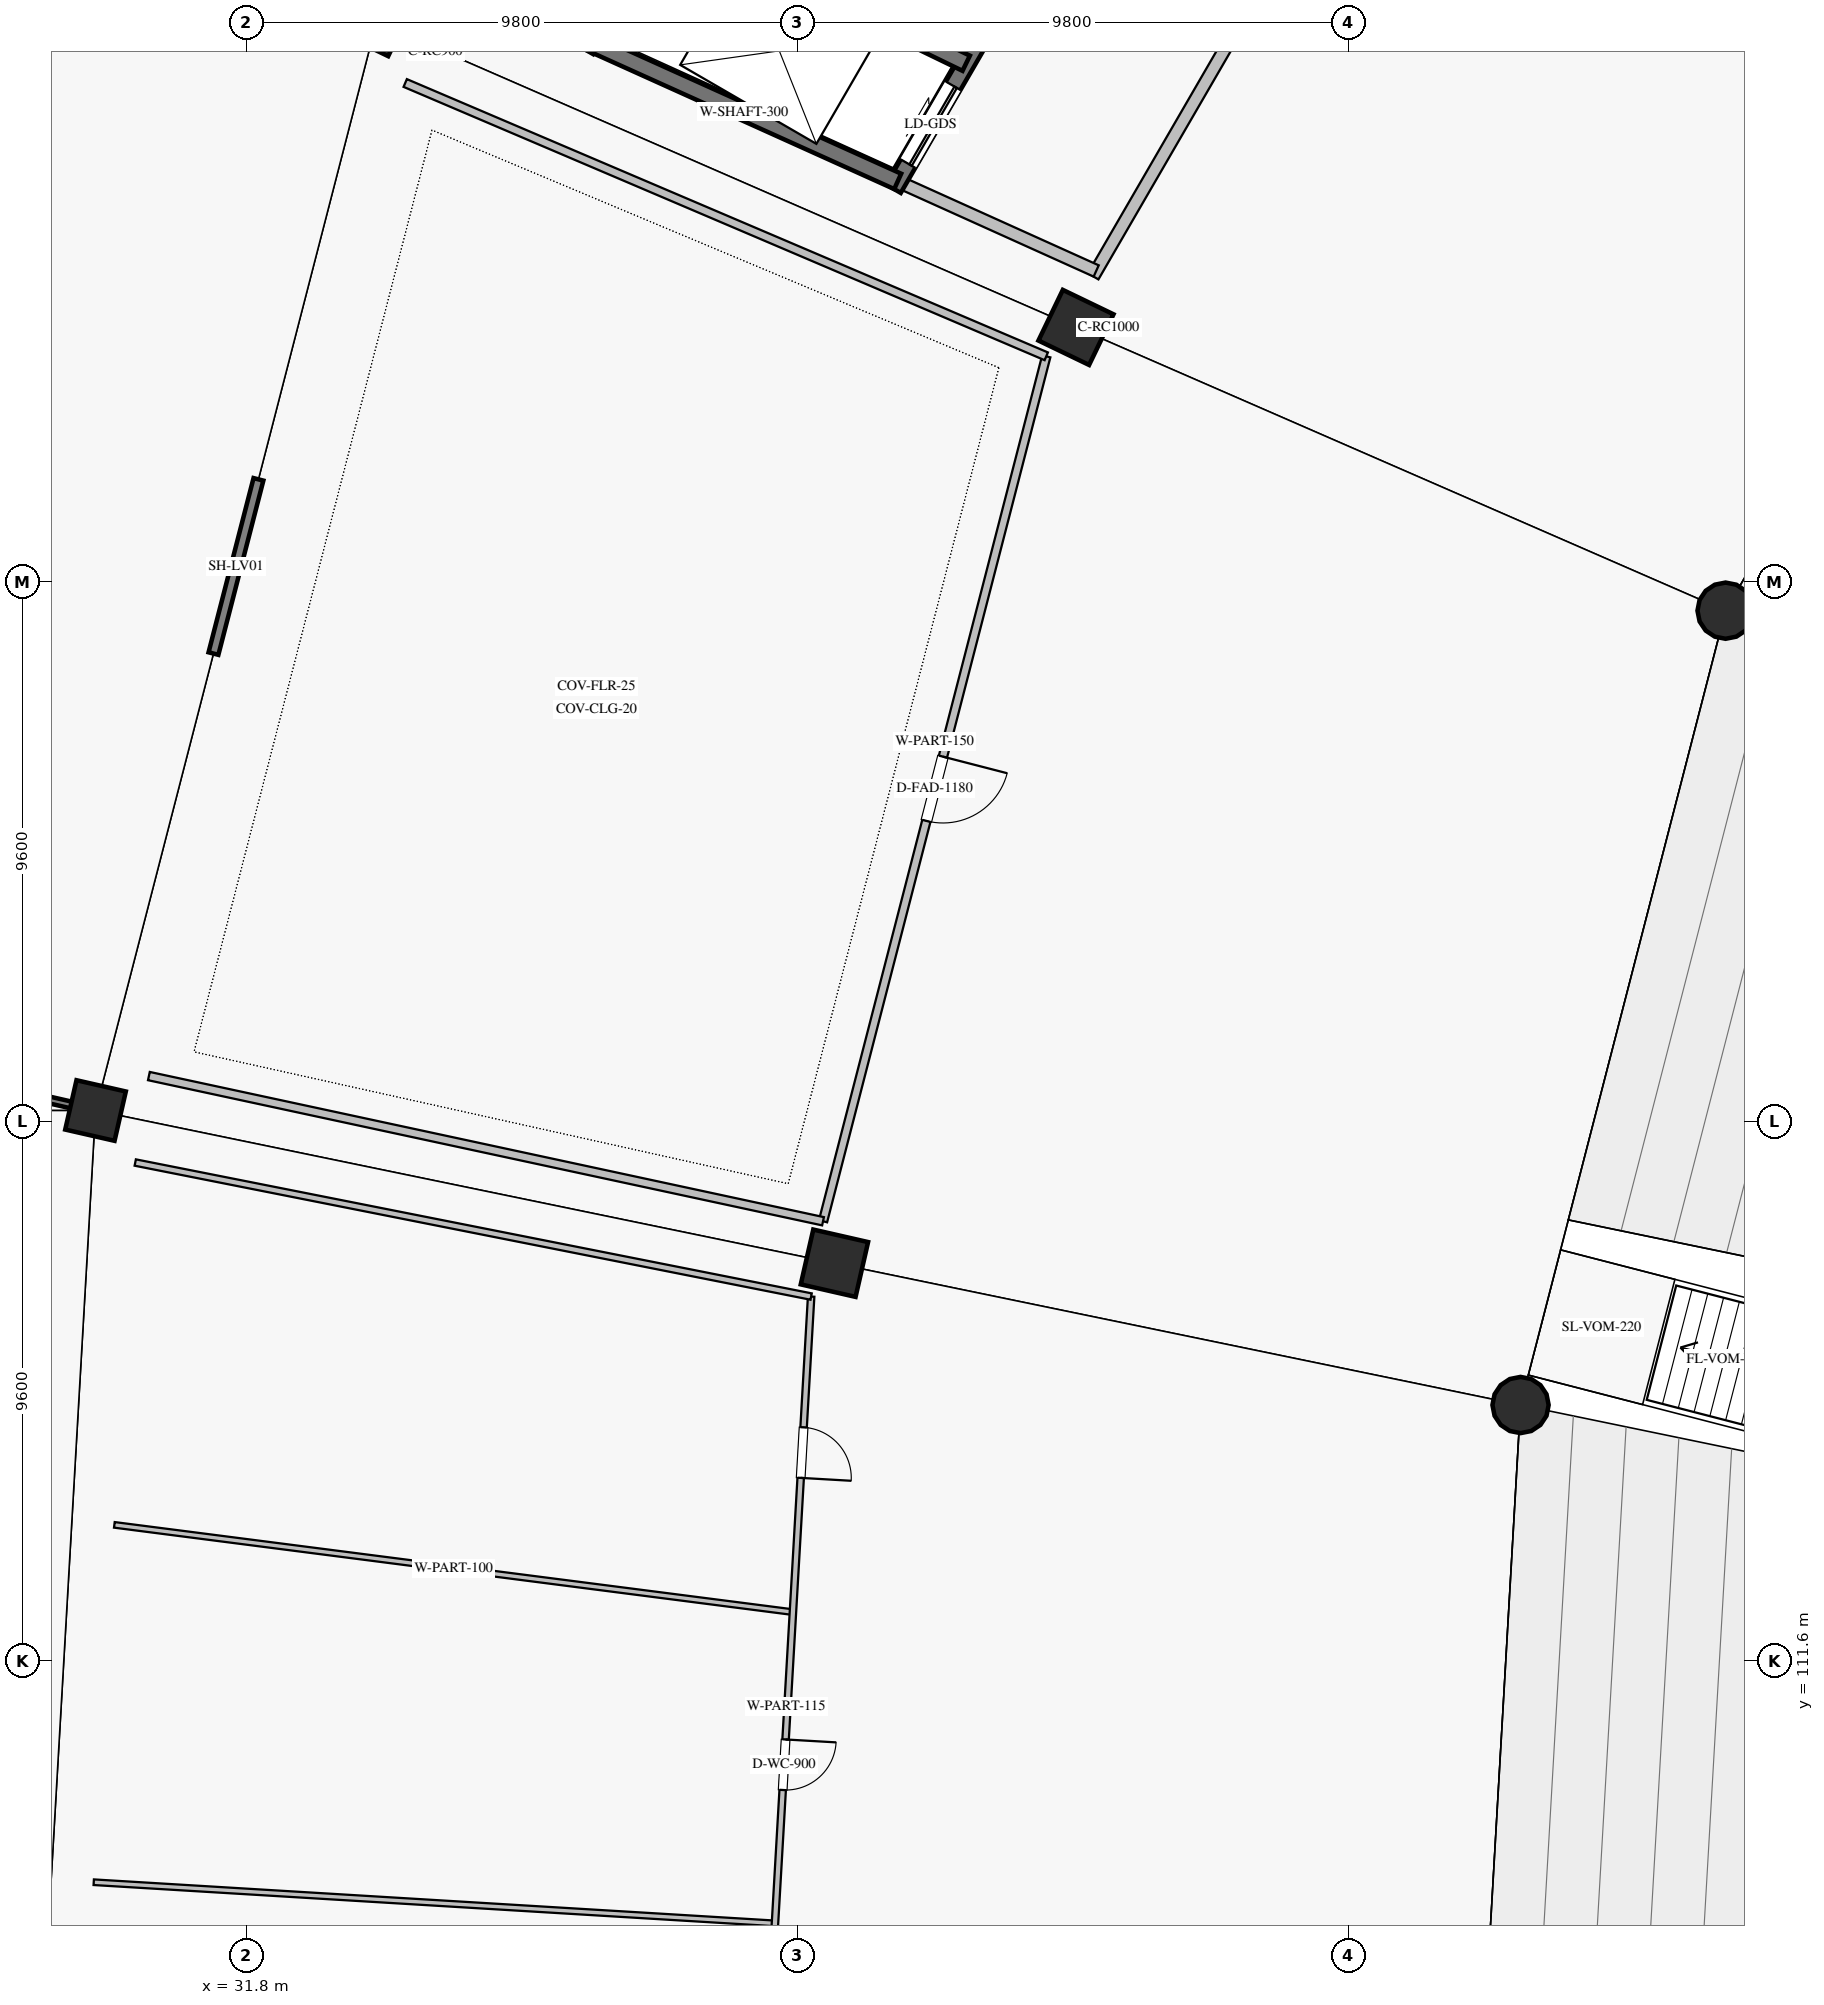
"""IFC4 building model, lengths in metres.
Left out: names, types, materials, properties, quantities, classifications, styles, units other than length and angle.
Written with IfcOpenShell. Run it as: python <this file> out.ifc"""

import sys

from ifc_helpers import new_model, si_unit, direction, frame, frame_2d, origin, origin_2d, place, context, subcontext, project, spatial, rectangle, circle, extrude, element, fill, save


model = new_model("IFC4")
c1 = context("Model", 3, precision=1e-05, world=origin(), true_north=direction((0.0, 1.0)))
c2 = subcontext(c1, "Body", "Model", "MODEL_VIEW")
j1 = project(units=[si_unit("LENGTHUNIT", "METRE"), si_unit("PLANEANGLEUNIT", "RADIAN")], contexts=[c1])
p1 = place(None, origin())
s1 = spatial("IfcSite", under=j1, at=p1, CompositionType="ELEMENT")
p2 = place(p1, origin())
s2 = spatial("IfcBuilding", under=s1, at=p2, CompositionType="ELEMENT")
p3 = place(p2, frame((0.0, 0.0, 5.78)))
s3 = spatial("IfcBuildingStorey", under=s2, at=p3, CompositionType="ELEMENT", Elevation=5.78)
for number, where, z_axis, x_axis in (
    (1, (58.114, 130.287, 0.0), (0.0, 0.0, 1.0), (-0.901, 0.434, 0.0)),
    (2, (54.467, 116.16, 0.0), (0.0, 0.0, 1.0), (-0.975, 0.223, 0.0)),
):
    element("IfcColumn", number, at=place(p3, frame(where, z_axis=z_axis, x_axis=x_axis)), inside=s3, PredefinedType="COLUMN", context=c2, shape_type="SweptSolid", body=[
        extrude(circle(Radius=0.5, at=origin_2d()), origin(), (0.0, 0.0, 1.0), 4.76),
    ])
for number, where, z_axis, x_axis in (
    (3, (46.559, 135.325, 0.0), (0.0, 0.0, 1.0), (-0.901, 0.434, 0.0)),
    (4, (42.262, 118.682, 0.0), (0.0, 0.0, 1.0), (-0.975, 0.223, 0.0)),
):
    element("IfcColumn", number, at=place(p3, frame(where, z_axis=z_axis, x_axis=x_axis)), inside=s3, PredefinedType="COLUMN", context=c2, shape_type="SweptSolid", body=[
        extrude(rectangle(XDim=1.0, YDim=1.0, at=origin_2d()), origin(), (0.0, 0.0, 1.0), 4.76),
    ])
for number, where, z_axis, x_axis in (
    (5, (34.115, 140.75, 0.0), (0.0, 0.0, 1.0), (-0.901, 0.434, 0.0)),
    (6, (29.119, 121.398, 0.0), (0.0, 0.0, 1.0), (-0.975, 0.223, 0.0)),
):
    element("IfcColumn", number, at=place(p3, frame(where, z_axis=z_axis, x_axis=x_axis)), inside=s3, PredefinedType="COLUMN", context=c2, shape_type="SweptSolid", body=[
        extrude(rectangle(XDim=0.9, YDim=0.9, at=origin_2d()), origin(), (0.0, 0.0, 1.0), 4.76),
    ])
p4 = place(p3, frame((45.9, 142.254, 0.0), z_axis=(0.0, 0.0, 1.0), x_axis=(-0.501629534056, -0.86508254552, 0.0)))
e7 = element("IfcWall", 7, at=p4, inside=s3, PredefinedType="SHEAR", context=c2, shape_type="SweptSolid", body=[
    extrude(rectangle(XDim=5.157, YDim=0.3, at=frame_2d((2.579, 0.0))), origin(), (0.0, 0.0, 1.0), 4.5),
])
p5 = place(p4, frame((0.766, 0.0, 0.0)))
e8 = element("IfcOpeningElement", 8, at=p5, cuts=e7, PredefinedType="OPENING", context=c2, shape_type="SweptSolid", body=[
    extrude(rectangle(XDim=1.1, YDim=2.2, at=frame_2d((0.55, 1.1))), frame((0.0, 0.16, 0.0), z_axis=(0.0, -1.0, 0.0), x_axis=(1.0, 0.0, 0.0)), (0.0, 0.0, 1.0), 0.32),
])
p6 = place(p4, frame((3.042, 0.0, 0.0)))
e9 = element("IfcOpeningElement", 9, at=p6, cuts=e7, PredefinedType="OPENING", context=c2, shape_type="SweptSolid", body=[
    extrude(rectangle(XDim=1.6, YDim=2.3, at=frame_2d((0.8, 1.15))), frame((0.0, 0.16, 0.0), z_axis=(0.0, -1.0, 0.0), x_axis=(1.0, 0.0, 0.0)), (0.0, 0.0, 1.0), 0.32),
])
p7 = place(p3, frame((40.595, 145.012, 0.0), z_axis=(0.0, 0.0, 1.0), x_axis=(-0.501630260479, -0.865082124293, 0.0)))
e10 = element("IfcWall", 10, at=p7, inside=s3, PredefinedType="SHEAR", context=c2, shape_type="SweptSolid", body=[
    extrude(rectangle(XDim=5.491, YDim=0.3, at=frame_2d((2.746, 0.0))), origin(), (0.0, 0.0, 1.0), 4.5),
])
p8 = place(p3, frame((43.388, 137.922, 0.0), z_axis=(0.0, 0.0, 1.0), x_axis=(-0.911521602376, 0.41125219562, 0.0)))
e11 = element("IfcWall", 11, at=p8, inside=s3, PredefinedType="SHEAR", context=c2, shape_type="SweptSolid", body=[
    extrude(rectangle(XDim=6.004, YDim=0.3, at=frame_2d((3.002, 0.0))), origin(), (0.0, 0.0, 1.0), 4.5),
])
p9 = place(p3, frame((44.606, 140.023, 0.0), z_axis=(0.0, 0.0, 1.0), x_axis=(-0.899759302591, 0.436386522936, 0.0)))
e12 = element("IfcWall", 12, at=p9, inside=s3, PredefinedType="SHEAR", context=c2, shape_type="SweptSolid", body=[
    extrude(rectangle(XDim=5.989, YDim=0.3, at=frame_2d((2.995, 0.0))), origin(), (0.0, 0.0, 1.0), 4.5),
])
p10 = place(p3, frame((54.944, 150.17, 0.0), z_axis=(0.0, 0.0, 1.0), x_axis=(-0.501612626242, -0.865092349518, 0.0)))
e13 = element("IfcWall", 13, at=p10, inside=s3, PredefinedType="SOLIDWALL", context=c2, shape_type="SweptSolid", body=[
    extrude(rectangle(XDim=16.11, YDim=0.22, at=frame_2d((8.055, 0.0))), origin(), (0.0, 0.0, 1.0), 3.448),
])
p11 = place(p10, frame((6.511, 0.0, 0.0)))
e14 = element("IfcOpeningElement", 14, at=p11, cuts=e13, PredefinedType="OPENING", context=c2, shape_type="SweptSolid", body=[
    extrude(rectangle(XDim=1.5, YDim=2.2, at=frame_2d((0.75, 1.1))), frame((0.0, 0.12, 0.0), z_axis=(0.0, -1.0, 0.0), x_axis=(1.0, 0.0, 0.0)), (0.0, 0.0, 1.0), 0.24),
])
p12 = place(p3, frame((46.918, 136.329, 0.0), z_axis=(0.0, 0.0, 1.0), x_axis=(-0.91149641055, 0.411308027582, 0.0)))
e15 = element("IfcWall", 15, at=p12, inside=s3, PredefinedType="SOLIDWALL", context=c2, shape_type="SweptSolid", body=[
    extrude(rectangle(XDim=3.873, YDim=0.22, at=frame_2d((1.937, 0.0))), origin(), (0.0, 0.0, 1.0), 4.5),
])
p13 = place(p3, frame((46.031, 134.811, 0.0), z_axis=(0.0, 0.0, 1.0), x_axis=(-0.249970043824, -0.968253570709, 0.0)))
e16 = element("IfcWall", 16, at=p13, inside=s3, PredefinedType="PARTITIONING", context=c2, shape_type="SweptSolid", body=[
    extrude(rectangle(XDim=15.887, YDim=0.15, at=frame_2d((7.943, 0.0))), origin(), (0.0, 0.0, 1.0), 3.82),
])
p14 = place(p13, frame((7.353, 0.0, 0.0)))
e17 = element("IfcOpeningElement", 17, at=p14, cuts=e16, PredefinedType="OPENING", context=c2, shape_type="SweptSolid", body=[
    extrude(rectangle(XDim=1.18, YDim=2.15, at=frame_2d((0.59, 1.075))), frame((0.0, 0.085, 0.0), z_axis=(0.0, -1.0, 0.0), x_axis=(1.0, 0.0, 0.0)), (0.0, 0.0, 1.0), 0.17),
])
p15 = place(p3, frame((46.031, 134.811, 0.0), z_axis=(0.0, 0.0, 1.0), x_axis=(-0.919905328402, 0.392140519173, 0.0)))
e18 = element("IfcWall", 18, at=p15, inside=s3, PredefinedType="PARTITIONING", context=c2, shape_type="SweptSolid", body=[
    extrude(rectangle(XDim=12.396, YDim=0.15, at=frame_2d((6.198, 0.0))), origin(), (0.0, 0.0, 1.0), 3.82),
])
p16 = place(p3, frame((42.06, 119.428, 0.0), z_axis=(0.0, 0.0, 1.0), x_axis=(-0.97759337709, 0.210502230558, 0.0)))
e19 = element("IfcWall", 19, at=p16, inside=s3, PredefinedType="PARTITIONING", context=c2, shape_type="SweptSolid", body=[
    extrude(rectangle(XDim=12.266, YDim=0.15, at=frame_2d((6.133, 0.0))), origin(), (0.0, 0.0, 1.0), 3.82),
])
p17 = place(p3, frame((41.848, 118.089, 0.0), z_axis=(0.0, 0.0, 1.0), x_axis=(-0.057603503798, -0.998339539611, 0.0)))
e20 = element("IfcWall", 20, at=p17, inside=s3, PredefinedType="PARTITIONING", context=c2, shape_type="SweptSolid", body=[
    extrude(rectangle(XDim=15.444, YDim=0.115, at=frame_2d((7.722, 0.0))), origin(), (0.0, 0.0, 1.0), 3.82),
])
p18 = place(p17, frame((2.33, 0.0, 0.0)))
e21 = element("IfcOpeningElement", 21, at=p18, cuts=e20, PredefinedType="OPENING", context=c2, shape_type="SweptSolid", body=[
    extrude(rectangle(XDim=0.9, YDim=2.1, at=frame_2d((0.45, 1.05))), frame((0.0, 0.067, 0.0), z_axis=(0.0, -1.0, 0.0), x_axis=(1.0, 0.0, 0.0)), (0.0, 0.0, 1.0), 0.135),
])
p19 = place(p17, frame((7.89, 0.0, 0.0)))
e22 = element("IfcOpeningElement", 22, at=p19, cuts=e20, PredefinedType="OPENING", context=c2, shape_type="SweptSolid", body=[
    extrude(rectangle(XDim=0.9, YDim=2.1, at=frame_2d((0.45, 1.05))), frame((0.0, 0.067, 0.0), z_axis=(0.0, -1.0, 0.0), x_axis=(1.0, 0.0, 0.0)), (0.0, 0.0, 1.0), 0.135),
])
p20 = place(p17, frame((12.757, 0.0, 0.0)))
e23 = element("IfcOpeningElement", 23, at=p20, cuts=e20, PredefinedType="OPENING", context=c2, shape_type="SweptSolid", body=[
    extrude(rectangle(XDim=1.05, YDim=2.1, at=frame_2d((0.525, 1.05))), frame((0.0, 0.067, 0.0), z_axis=(0.0, -1.0, 0.0), x_axis=(1.0, 0.0, 0.0)), (0.0, 0.0, 1.0), 0.135),
])
p21 = place(p3, frame((41.848, 118.089, 0.0), z_axis=(0.0, 0.0, 1.0), x_axis=(-0.980904167784, 0.194491680088, 0.0)))
e24 = element("IfcWall", 24, at=p21, inside=s3, PredefinedType="PARTITIONING", context=c2, shape_type="SweptSolid", body=[
    extrude(rectangle(XDim=12.257, YDim=0.115, at=frame_2d((6.128, 0.0))), origin(), (0.0, 0.0, 1.0), 3.82),
])
p22 = place(p3, frame((41.524, 112.477, 0.0), z_axis=(0.0, 0.0, 1.0), x_axis=(-0.991834687824, 0.127530200455, 0.0)))
e25 = element("IfcWall", 25, at=p22, inside=s3, PredefinedType="PARTITIONING", context=c2, shape_type="SweptSolid", body=[
    extrude(rectangle(XDim=12.17, YDim=0.1, at=frame_2d((6.085, 0.0))), origin(), (0.0, 0.0, 1.0), 3.82),
])
p23 = place(p3, frame((41.205, 106.941, 0.0), z_axis=(0.0, 0.0, 1.0), x_axis=(-0.998180767001, 0.060292258119, 0.0)))
e26 = element("IfcWall", 26, at=p23, inside=s3, PredefinedType="PARTITIONING", context=c2, shape_type="SweptSolid", body=[
    extrude(rectangle(XDim=12.14, YDim=0.1, at=frame_2d((6.07, 0.0))), origin(), (0.0, 0.0, 1.0), 3.82),
])
p24 = place(p6, origin())
e27 = element("IfcDoor", 27, at=p24, inside=s3, OperationType="SLIDING_TO_LEFT", PredefinedType="DOOR", context=c2, shape_type="SweptSolid", body=[
    extrude(rectangle(XDim=1.6, YDim=2.3, at=frame_2d((0.8, 1.15))), frame((0.0, 0.025, 0.0), z_axis=(0.0, -1.0, 0.0), x_axis=(1.0, 0.0, 0.0)), (0.0, 0.0, 1.0), 0.05),
])
fill(e9, e27)
p25 = place(p14, origin())
e28 = element("IfcDoor", 28, at=p25, inside=s3, OperationType="SINGLE_SWING_LEFT", PredefinedType="DOOR", context=c2, shape_type="SweptSolid", body=[
    extrude(rectangle(XDim=1.18, YDim=2.15, at=frame_2d((0.59, 1.075))), frame((0.0, 0.025, 0.0), z_axis=(0.0, -1.0, 0.0), x_axis=(1.0, 0.0, 0.0)), (0.0, 0.0, 1.0), 0.05),
])
fill(e17, e28)
p26 = place(p18, origin())
e29 = element("IfcDoor", 29, at=p26, inside=s3, OperationType="SINGLE_SWING_RIGHT", PredefinedType="DOOR", context=c2, shape_type="SweptSolid", body=[
    extrude(rectangle(XDim=0.9, YDim=2.1, at=frame_2d((0.45, 1.05))), frame((0.0, 0.025, 0.0), z_axis=(0.0, -1.0, 0.0), x_axis=(1.0, 0.0, 0.0)), (0.0, 0.0, 1.0), 0.05),
])
fill(e21, e29)
p27 = place(p19, origin())
e30 = element("IfcDoor", 30, at=p27, inside=s3, OperationType="SINGLE_SWING_LEFT", PredefinedType="DOOR", context=c2, shape_type="SweptSolid", body=[
    extrude(rectangle(XDim=0.9, YDim=2.1, at=frame_2d((0.45, 1.05))), frame((0.0, 0.025, 0.0), z_axis=(0.0, -1.0, 0.0), x_axis=(1.0, 0.0, 0.0)), (0.0, 0.0, 1.0), 0.05),
])
fill(e22, e30)
save(model, sys.argv[1])
